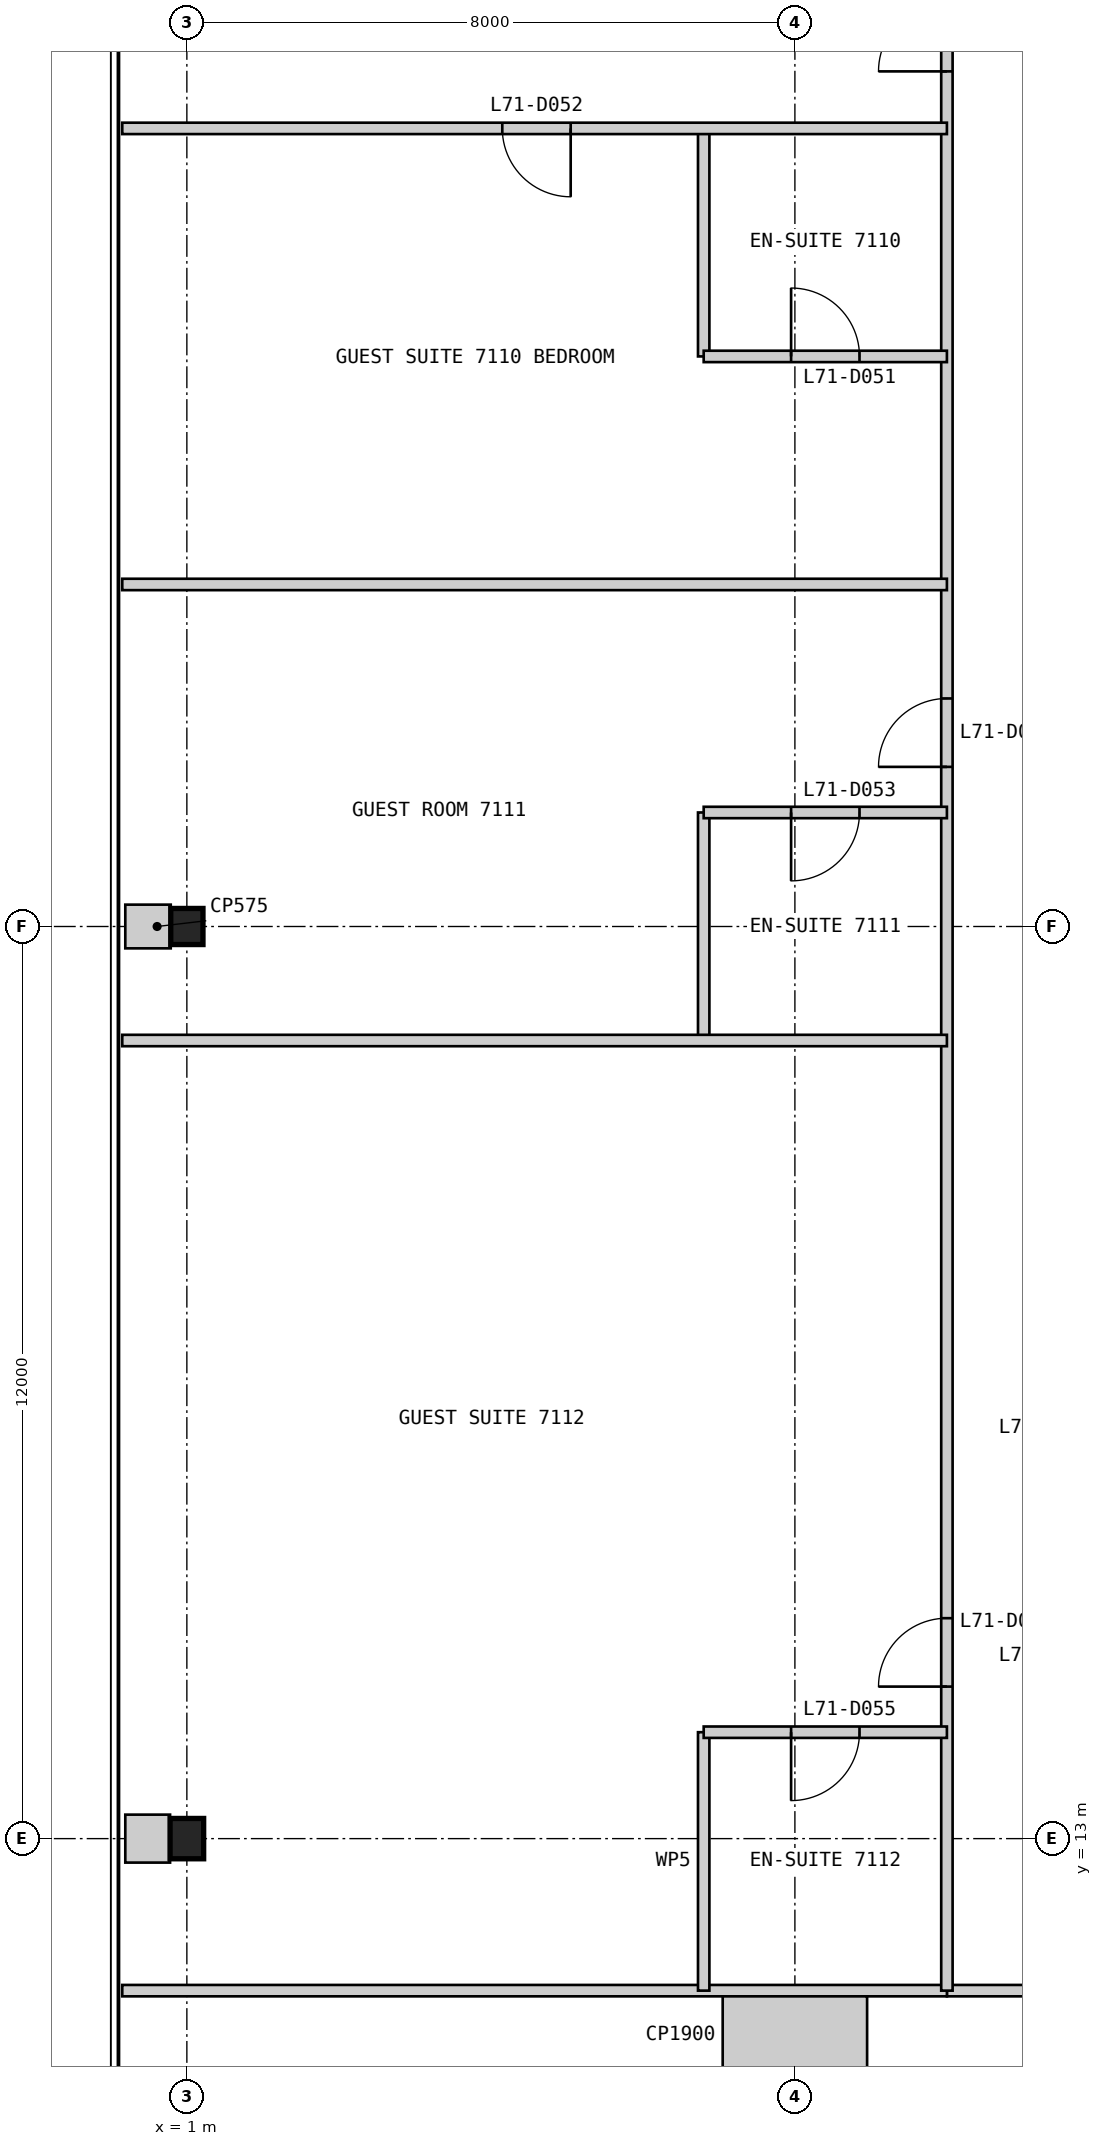
"""IFC4 building model, lengths in metres.
Left out: names, types, materials, properties, quantities, classifications, styles, units other than length and angle.
Written with IfcOpenShell. Run it as: python <this file> out.ifc"""

import sys

from ifc_helpers import new_model, si_unit, direction, frame, frame_2d, origin, origin_2d, place, context, subcontext, project, spatial, rectangle, i_section, extrude, element, fill, save


model = new_model("IFC4")
c1 = context("Model", 3, precision=1e-05, world=origin(), true_north=direction((0.0, 1.0)))
c2 = subcontext(c1, "Body", "Model", "MODEL_VIEW")
j1 = project(units=[si_unit("LENGTHUNIT", "METRE"), si_unit("PLANEANGLEUNIT", "RADIAN")], contexts=[c1])
p1 = place(None, origin())
s1 = spatial("IfcSite", under=j1, at=p1, CompositionType="ELEMENT")
p2 = place(p1, origin())
s2 = spatial("IfcBuilding", under=s1, at=p2, CompositionType="ELEMENT")
p3 = place(p2, frame((0.0, 0.0, 293.4)))
s3 = spatial("IfcBuildingStorey", under=s2, at=p3, CompositionType="ELEMENT", Elevation=293.4)
p4 = place(p3, frame((1.0, 25.0, 0.0), z_axis=(0.0, 0.0, 1.0), x_axis=(1.0, 0.0, 0.0)))
e1 = element("IfcColumn", 1, at=p4, inside=s3, PredefinedType="COLUMN", context=c2, shape_type="SweptSolid", body=[
    extrude(i_section(OverallWidth=0.424, OverallDepth=0.475, WebThickness=0.048, FlangeThickness=0.077, at=origin_2d()), origin(), (0.0, 0.0, 1.0), 3.4),
])
p5 = place(p3, frame((1.0, 13.0, 0.0), z_axis=(0.0, 0.0, 1.0), x_axis=(1.0, 0.0, 0.0)))
e2 = element("IfcColumn", 2, at=p5, inside=s3, PredefinedType="COLUMN", context=c2, shape_type="SweptSolid", body=[
    extrude(i_section(OverallWidth=0.442, OverallDepth=0.531, WebThickness=0.066, FlangeThickness=0.106, at=origin_2d()), origin(), (0.0, 0.0, 1.0), 3.4),
])
p6 = place(p3, frame((11.0, 11.0, 0.0), z_axis=(0.0, 0.0, 1.0), x_axis=(1.0, 0.0, 0.0)))
e3 = element("IfcWall", 3, at=p6, inside=s3, PredefinedType="PARTITIONING", context=c2, shape_type="SweptSolid", body=[
    extrude(rectangle(XDim=28.0, YDim=0.15, at=frame_2d((14.0, 0.0))), origin(), (0.0, 0.0, 1.0), 2.794),
])
p7 = place(p6, frame((1.85, 0.0, 0.0)))
e4 = element("IfcOpeningElement", 4, at=p7, cuts=e3, PredefinedType="OPENING", context=c2, shape_type="SweptSolid", body=[
    extrude(rectangle(XDim=1.0, YDim=2.1, at=frame_2d((0.5, 1.05))), frame((0.0, 0.085, 0.0), z_axis=(0.0, -1.0, 0.0), x_axis=(1.0, 0.0, 0.0)), (0.0, 0.0, 1.0), 0.17),
])
p8 = place(p6, frame((18.1, 0.0, 0.0)))
e5 = element("IfcOpeningElement", 5, at=p8, cuts=e3, PredefinedType="OPENING", context=c2, shape_type="SweptSolid", body=[
    extrude(rectangle(XDim=0.9, YDim=2.1, at=frame_2d((0.45, 1.05))), frame((0.0, 0.085, 0.0), z_axis=(0.0, -1.0, 0.0), x_axis=(1.0, 0.0, 0.0)), (0.0, 0.0, 1.0), 0.17),
])
p9 = place(p3, frame((0.15, 11.0, 0.0), z_axis=(0.0, 0.0, 1.0), x_axis=(1.0, 0.0, 0.0)))
e6 = element("IfcWall", 6, at=p9, inside=s3, PredefinedType="PARTITIONING", context=c2, shape_type="SweptSolid", body=[
    extrude(rectangle(XDim=10.85, YDim=0.15, at=frame_2d((5.425, 0.0))), origin(), (0.0, 0.0, 1.0), 2.794),
])
p10 = place(p3, frame((11.0, 39.0, 0.0), z_axis=(0.0, 0.0, 1.0), x_axis=(0.0, -1.0, 0.0)))
e7 = element("IfcWall", 7, at=p10, inside=s3, PredefinedType="PARTITIONING", context=c2, shape_type="SweptSolid", body=[
    extrude(rectangle(XDim=28.0, YDim=0.15, at=frame_2d((14.0, 0.0))), origin(), (0.0, 0.0, 1.0), 2.794),
])
p11 = place(p10, frame((1.85, 0.0, 0.0)))
e8 = element("IfcOpeningElement", 8, at=p11, cuts=e7, PredefinedType="OPENING", context=c2, shape_type="SweptSolid", body=[
    extrude(rectangle(XDim=0.9, YDim=2.1, at=frame_2d((0.45, 1.05))), frame((0.0, 0.085, 0.0), z_axis=(0.0, -1.0, 0.0), x_axis=(1.0, 0.0, 0.0)), (0.0, 0.0, 1.0), 0.17),
])
p12 = place(p10, frame((11.0, 0.0, 0.0)))
e9 = element("IfcOpeningElement", 9, at=p12, cuts=e7, PredefinedType="OPENING", context=c2, shape_type="SweptSolid", body=[
    extrude(rectangle(XDim=0.9, YDim=2.1, at=frame_2d((0.45, 1.05))), frame((0.0, 0.085, 0.0), z_axis=(0.0, -1.0, 0.0), x_axis=(1.0, 0.0, 0.0)), (0.0, 0.0, 1.0), 0.17),
])
p13 = place(p10, frame((23.1, 0.0, 0.0)))
e10 = element("IfcOpeningElement", 10, at=p13, cuts=e7, PredefinedType="OPENING", context=c2, shape_type="SweptSolid", body=[
    extrude(rectangle(XDim=0.9, YDim=2.1, at=frame_2d((0.45, 1.05))), frame((0.0, 0.085, 0.0), z_axis=(0.0, -1.0, 0.0), x_axis=(1.0, 0.0, 0.0)), (0.0, 0.0, 1.0), 0.17),
])
p14 = place(p3, frame((7.8, 35.5, 0.0), z_axis=(0.0, 0.0, 1.0), x_axis=(0.0, -1.0, 0.0)))
e11 = element("IfcWall", 11, at=p14, inside=s3, PredefinedType="PARTITIONING", context=c2, shape_type="SweptSolid", body=[
    extrude(rectangle(XDim=3.0, YDim=0.15, at=frame_2d((1.5, 0.0))), origin(), (0.0, 0.0, 1.0), 3.2),
])
p15 = place(p3, frame((7.8, 32.5, 0.0), z_axis=(0.0, 0.0, 1.0), x_axis=(1.0, 0.0, 0.0)))
e12 = element("IfcWall", 12, at=p15, inside=s3, PredefinedType="PARTITIONING", context=c2, shape_type="SweptSolid", body=[
    extrude(rectangle(XDim=3.2, YDim=0.15, at=frame_2d((1.6, 0.0))), origin(), (0.0, 0.0, 1.0), 3.2),
])
p16 = place(p15, frame((1.15, 0.0, 0.0)))
e13 = element("IfcOpeningElement", 13, at=p16, cuts=e12, PredefinedType="OPENING", context=c2, shape_type="SweptSolid", body=[
    extrude(rectangle(XDim=0.9, YDim=2.1, at=frame_2d((0.45, 1.05))), frame((0.0, 0.085, 0.0), z_axis=(0.0, -1.0, 0.0), x_axis=(1.0, 0.0, 0.0)), (0.0, 0.0, 1.0), 0.17),
])
p17 = place(p3, frame((0.15, 35.5, 0.0), z_axis=(0.0, 0.0, 1.0), x_axis=(1.0, 0.0, 0.0)))
e14 = element("IfcWall", 14, at=p17, inside=s3, PredefinedType="PARTITIONING", context=c2, shape_type="SweptSolid", body=[
    extrude(rectangle(XDim=10.85, YDim=0.15, at=frame_2d((5.425, 0.0))), origin(), (0.0, 0.0, 1.0), 3.2),
])
p18 = place(p17, frame((5.0, 0.0, 0.0)))
e15 = element("IfcOpeningElement", 15, at=p18, cuts=e14, PredefinedType="OPENING", context=c2, shape_type="SweptSolid", body=[
    extrude(rectangle(XDim=0.9, YDim=2.1, at=frame_2d((0.45, 1.05))), frame((0.0, 0.085, 0.0), z_axis=(0.0, -1.0, 0.0), x_axis=(1.0, 0.0, 0.0)), (0.0, 0.0, 1.0), 0.17),
])
p19 = place(p3, frame((0.15, 29.5, 0.0), z_axis=(0.0, 0.0, 1.0), x_axis=(1.0, 0.0, 0.0)))
e16 = element("IfcWall", 16, at=p19, inside=s3, PredefinedType="PARTITIONING", context=c2, shape_type="SweptSolid", body=[
    extrude(rectangle(XDim=10.85, YDim=0.15, at=frame_2d((5.425, 0.0))), origin(), (0.0, 0.0, 1.0), 3.2),
])
p20 = place(p3, frame((7.8, 26.5, 0.0), z_axis=(0.0, 0.0, 1.0), x_axis=(0.0, -1.0, 0.0)))
e17 = element("IfcWall", 17, at=p20, inside=s3, PredefinedType="PARTITIONING", context=c2, shape_type="SweptSolid", body=[
    extrude(rectangle(XDim=3.0, YDim=0.15, at=frame_2d((1.5, 0.0))), origin(), (0.0, 0.0, 1.0), 3.2),
])
p21 = place(p3, frame((7.8, 26.5, 0.0), z_axis=(0.0, 0.0, 1.0), x_axis=(1.0, 0.0, 0.0)))
e18 = element("IfcWall", 18, at=p21, inside=s3, PredefinedType="PARTITIONING", context=c2, shape_type="SweptSolid", body=[
    extrude(rectangle(XDim=3.2, YDim=0.15, at=frame_2d((1.6, 0.0))), origin(), (0.0, 0.0, 1.0), 3.2),
])
p22 = place(p21, frame((1.15, 0.0, 0.0)))
e19 = element("IfcOpeningElement", 19, at=p22, cuts=e18, PredefinedType="OPENING", context=c2, shape_type="SweptSolid", body=[
    extrude(rectangle(XDim=0.9, YDim=2.1, at=frame_2d((0.45, 1.05))), frame((0.0, 0.085, 0.0), z_axis=(0.0, -1.0, 0.0), x_axis=(1.0, 0.0, 0.0)), (0.0, 0.0, 1.0), 0.17),
])
p23 = place(p3, frame((0.15, 23.5, 0.0), z_axis=(0.0, 0.0, 1.0), x_axis=(1.0, 0.0, 0.0)))
e20 = element("IfcWall", 20, at=p23, inside=s3, PredefinedType="PARTITIONING", context=c2, shape_type="SweptSolid", body=[
    extrude(rectangle(XDim=10.85, YDim=0.15, at=frame_2d((5.425, 0.0))), origin(), (0.0, 0.0, 1.0), 3.2),
])
p24 = place(p3, frame((7.8, 14.4, 0.0), z_axis=(0.0, 0.0, 1.0), x_axis=(0.0, -1.0, 0.0)))
e21 = element("IfcWall", 21, at=p24, inside=s3, PredefinedType="PARTITIONING", context=c2, shape_type="SweptSolid", body=[
    extrude(rectangle(XDim=3.4, YDim=0.15, at=frame_2d((1.7, 0.0))), origin(), (0.0, 0.0, 1.0), 3.2),
])
p25 = place(p3, frame((7.8, 14.4, 0.0), z_axis=(0.0, 0.0, 1.0), x_axis=(1.0, 0.0, 0.0)))
e22 = element("IfcWall", 22, at=p25, inside=s3, PredefinedType="PARTITIONING", context=c2, shape_type="SweptSolid", body=[
    extrude(rectangle(XDim=3.2, YDim=0.15, at=frame_2d((1.6, 0.0))), origin(), (0.0, 0.0, 1.0), 3.2),
])
p26 = place(p25, frame((1.15, 0.0, 0.0)))
e23 = element("IfcOpeningElement", 23, at=p26, cuts=e22, PredefinedType="OPENING", context=c2, shape_type="SweptSolid", body=[
    extrude(rectangle(XDim=0.9, YDim=2.1, at=frame_2d((0.45, 1.05))), frame((0.0, 0.085, 0.0), z_axis=(0.0, -1.0, 0.0), x_axis=(1.0, 0.0, 0.0)), (0.0, 0.0, 1.0), 0.17),
])
p27 = place(p3, frame((9.0, 10.925, 0.0), z_axis=(0.0, 0.0, 1.0), x_axis=(0.0, -1.0, 0.0)))
e24 = element("IfcWall", 24, at=p27, inside=s3, PredefinedType="PARTITIONING", context=c2, shape_type="SweptSolid", body=[
    extrude(rectangle(XDim=1.025, YDim=1.9, at=frame_2d((0.513, 0.0))), origin(), (0.0, 0.0, 1.0), 3.2),
])
p28 = place(p3, frame((0.19, 25.0, 0.0), z_axis=(0.0, 0.0, 1.0), x_axis=(1.0, 0.0, 0.0)))
e25 = element("IfcWall", 25, at=p28, inside=s3, PredefinedType="PARTITIONING", context=c2, shape_type="SweptSolid", body=[
    extrude(rectangle(XDim=0.598, YDim=0.575, at=frame_2d((0.299, 0.0))), origin(), (0.0, 0.0, 1.0), 3.2),
])
p29 = place(p3, frame((0.19, 13.0, 0.0), z_axis=(0.0, 0.0, 1.0), x_axis=(1.0, 0.0, 0.0)))
e26 = element("IfcWall", 26, at=p29, inside=s3, PredefinedType="PARTITIONING", context=c2, shape_type="SweptSolid", body=[
    extrude(rectangle(XDim=0.589, YDim=0.631, at=frame_2d((0.294, 0.0))), origin(), (0.0, 0.0, 1.0), 3.2),
])
p30 = place(p11, frame((0.9, 0.0, 0.0), z_axis=(0.0, 0.0, 1.0), x_axis=(-1.0, 0.0, 0.0)))
e27 = element("IfcDoor", 27, at=p30, inside=s3, OperationType="SINGLE_SWING_LEFT", PredefinedType="DOOR", context=c2, shape_type="SweptSolid", body=[
    extrude(rectangle(XDim=0.9, YDim=2.1, at=frame_2d((0.45, 1.05))), frame((0.0, 0.025, 0.0), z_axis=(0.0, -1.0, 0.0), x_axis=(1.0, 0.0, 0.0)), (0.0, 0.0, 1.0), 0.05),
])
fill(e8, e27)
p31 = place(p16, origin())
e28 = element("IfcDoor", 28, at=p31, inside=s3, OperationType="SINGLE_SWING_LEFT", PredefinedType="DOOR", context=c2, shape_type="SweptSolid", body=[
    extrude(rectangle(XDim=0.9, YDim=2.1, at=frame_2d((0.45, 1.05))), frame((0.0, 0.025, 0.0), z_axis=(0.0, -1.0, 0.0), x_axis=(1.0, 0.0, 0.0)), (0.0, 0.0, 1.0), 0.05),
])
fill(e13, e28)
p32 = place(p18, frame((0.9, 0.0, 0.0), z_axis=(0.0, 0.0, 1.0), x_axis=(-1.0, 0.0, 0.0)))
e29 = element("IfcDoor", 29, at=p32, inside=s3, OperationType="SINGLE_SWING_LEFT", PredefinedType="DOOR", context=c2, shape_type="SweptSolid", body=[
    extrude(rectangle(XDim=0.9, YDim=2.1, at=frame_2d((0.45, 1.05))), frame((0.0, 0.025, 0.0), z_axis=(0.0, -1.0, 0.0), x_axis=(1.0, 0.0, 0.0)), (0.0, 0.0, 1.0), 0.05),
])
fill(e15, e29)
p33 = place(p22, frame((0.9, 0.0, 0.0), z_axis=(0.0, 0.0, 1.0), x_axis=(-1.0, 0.0, 0.0)))
e30 = element("IfcDoor", 30, at=p33, inside=s3, OperationType="SINGLE_SWING_RIGHT", PredefinedType="DOOR", context=c2, shape_type="SweptSolid", body=[
    extrude(rectangle(XDim=0.9, YDim=2.1, at=frame_2d((0.45, 1.05))), frame((0.0, 0.025, 0.0), z_axis=(0.0, -1.0, 0.0), x_axis=(1.0, 0.0, 0.0)), (0.0, 0.0, 1.0), 0.05),
])
fill(e19, e30)
p34 = place(p12, frame((0.9, 0.0, 0.0), z_axis=(0.0, 0.0, 1.0), x_axis=(-1.0, 0.0, 0.0)))
e31 = element("IfcDoor", 31, at=p34, inside=s3, OperationType="SINGLE_SWING_LEFT", PredefinedType="DOOR", context=c2, shape_type="SweptSolid", body=[
    extrude(rectangle(XDim=0.9, YDim=2.1, at=frame_2d((0.45, 1.05))), frame((0.0, 0.025, 0.0), z_axis=(0.0, -1.0, 0.0), x_axis=(1.0, 0.0, 0.0)), (0.0, 0.0, 1.0), 0.05),
])
fill(e9, e31)
p35 = place(p26, frame((0.9, 0.0, 0.0), z_axis=(0.0, 0.0, 1.0), x_axis=(-1.0, 0.0, 0.0)))
e32 = element("IfcDoor", 32, at=p35, inside=s3, OperationType="SINGLE_SWING_RIGHT", PredefinedType="DOOR", context=c2, shape_type="SweptSolid", body=[
    extrude(rectangle(XDim=0.9, YDim=2.1, at=frame_2d((0.45, 1.05))), frame((0.0, 0.025, 0.0), z_axis=(0.0, -1.0, 0.0), x_axis=(1.0, 0.0, 0.0)), (0.0, 0.0, 1.0), 0.05),
])
fill(e23, e32)
p36 = place(p13, frame((0.9, 0.0, 0.0), z_axis=(0.0, 0.0, 1.0), x_axis=(-1.0, 0.0, 0.0)))
e33 = element("IfcDoor", 33, at=p36, inside=s3, OperationType="SINGLE_SWING_LEFT", PredefinedType="DOOR", context=c2, shape_type="SweptSolid", body=[
    extrude(rectangle(XDim=0.9, YDim=2.1, at=frame_2d((0.45, 1.05))), frame((0.0, 0.025, 0.0), z_axis=(0.0, -1.0, 0.0), x_axis=(1.0, 0.0, 0.0)), (0.0, 0.0, 1.0), 0.05),
])
fill(e10, e33)
save(model, sys.argv[1])
